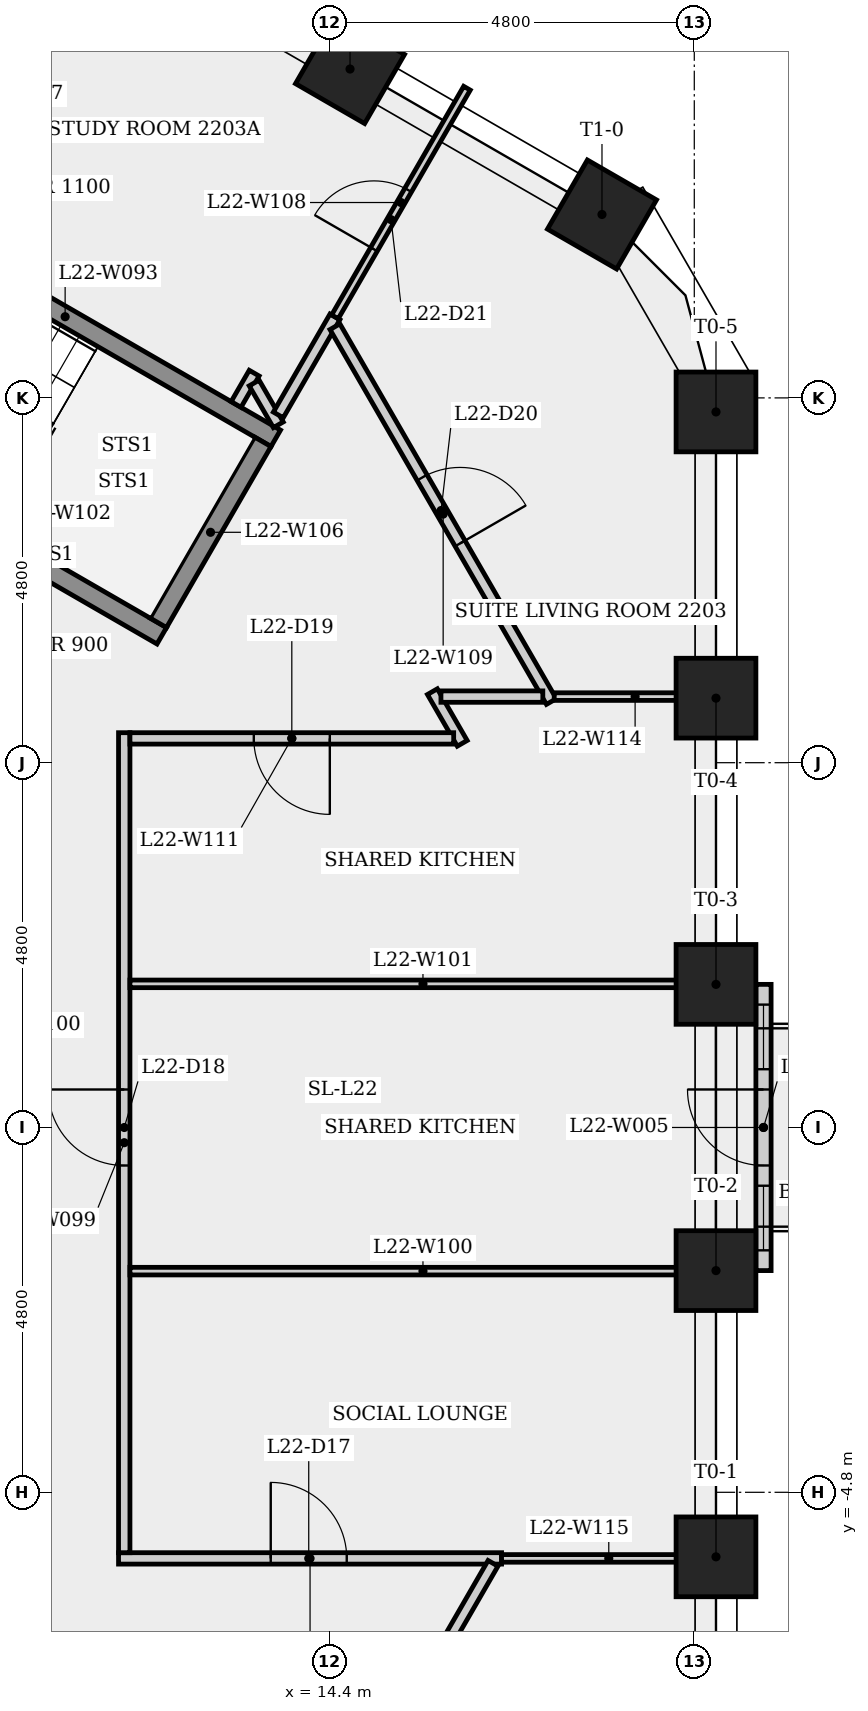
"""IFC4 building model, lengths in metres.
Left out: names, types, materials, properties, quantities, classifications, styles, units other than length and angle.
Written with IfcOpenShell. Run it as: python <this file> out.ifc"""

import sys

from ifc_helpers import new_model, si_unit, direction, frame, frame_2d, origin, origin_2d, place, context, subcontext, project, spatial, rectangle, extrude, element, fill, save


model = new_model("IFC4")
c1 = context("Model", 3, precision=1e-05, world=origin(), true_north=direction((0.0, 1.0)))
c2 = subcontext(c1, "Body", "Model", "MODEL_VIEW")
j1 = project(units=[si_unit("LENGTHUNIT", "METRE"), si_unit("PLANEANGLEUNIT", "RADIAN")], contexts=[c1])
p1 = place(None, origin())
s1 = spatial("IfcSite", under=j1, at=p1, CompositionType="ELEMENT")
p2 = place(p1, origin())
s2 = spatial("IfcBuilding", under=s1, at=p2, CompositionType="ELEMENT")
p3 = place(p2, frame((0.0, 0.0, 86.5)))
s3 = spatial("IfcBuildingStorey", under=s2, at=p3, CompositionType="ELEMENT", Elevation=86.5)
for number, where, z_axis, x_axis in (
    (1, (19.486, -5.649, 0.0), (0.0, 0.0, 1.0), (1.0, 0.0, 0.0)),
    (2, (19.486, -1.883, 0.0), (0.0, 0.0, 1.0), (1.0, 0.0, 0.0)),
    (3, (19.486, 1.883, 0.0), (0.0, 0.0, 1.0), (1.0, 0.0, 0.0)),
    (4, (19.486, 5.649, 0.0), (0.0, 0.0, 1.0), (1.0, 0.0, 0.0)),
    (5, (19.486, 9.415, 0.0), (0.0, 0.0, 1.0), (1.0, 0.0, 0.0)),
    (6, (17.986, 12.013, 0.0), (0.0, 0.0, 1.0), (0.5, 0.866, 0.0)),
    (7, (14.671, 13.927, 0.0), (0.0, 0.0, 1.0), (0.5, 0.866, 0.0)),
):
    element("IfcColumn", number, at=place(p3, frame(where, z_axis=z_axis, x_axis=x_axis)), inside=s3, PredefinedType="COLUMN", context=c2, shape_type="SweptSolid", body=[
        extrude(rectangle(XDim=1.05, YDim=1.05, at=origin_2d()), origin(), (0.0, 0.0, 1.0), 3.4),
    ])
p4 = place(p3, frame((20.111, -1.883, 0.0), z_axis=(0.0, 0.0, 1.0), x_axis=(0.0, 1.0, 0.0)))
e8 = element("IfcWall", 8, at=p4, inside=s3, PredefinedType="SOLIDWALL", context=c2, shape_type="SweptSolid", body=[
    extrude(rectangle(XDim=3.766, YDim=0.2, at=frame_2d((1.883, 0.0))), origin(), (0.0, 0.0, 1.0), 3.4),
])
p5 = place(p4, frame((1.383, 0.0, 0.0)))
e9 = element("IfcOpeningElement", 9, at=p5, cuts=e8, PredefinedType="OPENING", context=c2, shape_type="SweptSolid", body=[
    extrude(rectangle(XDim=1.0, YDim=2.4, at=frame_2d((0.5, 1.2))), frame((0.0, 0.11, 0.0), z_axis=(0.0, -1.0, 0.0), x_axis=(1.0, 0.0, 0.0)), (0.0, 0.0, 1.0), 0.22),
])
p6 = place(p4, frame((0.267, 0.0, 0.9)))
e10 = element("IfcOpeningElement", 10, at=p6, cuts=e8, PredefinedType="OPENING", context=c2, shape_type="SweptSolid", body=[
    extrude(rectangle(XDim=0.85, YDim=1.5, at=frame_2d((0.425, 0.75))), frame((0.0, 0.11, 0.0), z_axis=(0.0, -1.0, 0.0), x_axis=(1.0, 0.0, 0.0)), (0.0, 0.0, 1.0), 0.22),
])
p7 = place(p4, frame((2.649, 0.0, 0.9)))
e11 = element("IfcOpeningElement", 11, at=p7, cuts=e8, PredefinedType="OPENING", context=c2, shape_type="SweptSolid", body=[
    extrude(rectangle(XDim=0.85, YDim=1.5, at=frame_2d((0.425, 0.75))), frame((0.0, 0.11, 0.0), z_axis=(0.0, -1.0, 0.0), x_axis=(1.0, 0.0, 0.0)), (0.0, 0.0, 1.0), 0.22),
])
p8 = place(p3, frame((8.151, 12.268, 0.0), z_axis=(0.0, 0.0, 1.0), x_axis=(0.866025499775, -0.499999833739, 0.0)))
e12 = element("IfcWall", 12, at=p8, inside=s3, PredefinedType="SHEAR", context=c2, shape_type="SweptSolid", body=[
    extrude(rectangle(XDim=6.4, YDim=0.25, at=frame_2d((3.2, 0.0))), origin(), (0.0, 0.0, 1.0), 3.05),
])
p9 = place(p3, frame((11.625, -5.67, 0.0), z_axis=(0.0, 0.0, 1.0), x_axis=(1.0, 0.0, 0.0)))
e13 = element("IfcWall", 13, at=p9, inside=s3, PredefinedType="PARTITIONING", context=c2, shape_type="SweptSolid", body=[
    extrude(rectangle(XDim=5.039, YDim=0.15, at=frame_2d((2.52, 0.0))), origin(), (0.0, 0.0, 1.0), 3.05),
])
p10 = place(p9, frame((2.002, 0.0, 0.0)))
e14 = element("IfcOpeningElement", 14, at=p10, cuts=e13, PredefinedType="OPENING", context=c2, shape_type="SweptSolid", body=[
    extrude(rectangle(XDim=1.0, YDim=2.1, at=frame_2d((0.5, 1.05))), frame((0.0, 0.085, 0.0), z_axis=(0.0, -1.0, 0.0), x_axis=(1.0, 0.0, 0.0)), (0.0, 0.0, 1.0), 0.17),
])
p11 = place(p3, frame((11.7, -5.595, 0.0), z_axis=(0.0, 0.0, 1.0), x_axis=(0.0, 1.0, 0.0)))
e15 = element("IfcWall", 15, at=p11, inside=s3, PredefinedType="PARTITIONING", context=c2, shape_type="SweptSolid", body=[
    extrude(rectangle(XDim=10.789, YDim=0.15, at=frame_2d((5.395, 0.0))), origin(), (0.0, 0.0, 1.0), 3.05),
])
p12 = place(p11, frame((5.095, 0.0, 0.0)))
e16 = element("IfcOpeningElement", 16, at=p12, cuts=e15, PredefinedType="OPENING", context=c2, shape_type="SweptSolid", body=[
    extrude(rectangle(XDim=1.0, YDim=2.1, at=frame_2d((0.5, 1.05))), frame((0.0, 0.085, 0.0), z_axis=(0.0, -1.0, 0.0), x_axis=(1.0, 0.0, 0.0)), (0.0, 0.0, 1.0), 0.17),
])
for number, where, z_axis, x_axis in (
    (17, (11.775, -1.89, 0.0), (0.0, 0.0, 1.0), (1.0, 0.0, 0.0)),
    (18, (11.775, 1.89, 0.0), (0.0, 0.0, 1.0), (1.0, 0.0, 0.0)),
):
    element("IfcWall", number, at=place(p3, frame(where, z_axis=z_axis, x_axis=x_axis)), inside=s3, PredefinedType="PARTITIONING", context=c2, shape_type="SweptSolid", body=[
        extrude(rectangle(XDim=7.711, YDim=0.1, at=frame_2d((3.855, 0.0))), origin(), (0.0, 0.0, 1.0), 3.05),
    ])
p13 = place(p3, frame((12.194, 6.47, 0.0), z_axis=(0.0, 0.0, 1.0), x_axis=(-0.866025499775, 0.499999833739, 0.0)))
e19 = element("IfcWall", 19, at=p13, inside=s3, PredefinedType="SHEAR", context=c2, shape_type="SweptSolid", body=[
    extrude(rectangle(XDim=6.4, YDim=0.25, at=frame_2d((3.2, 0.0))), origin(), (0.0, 0.0, 1.0), 3.05),
])
p14 = place(p13, frame((5.25, 0.0, 0.0)))
e20 = element("IfcOpeningElement", 20, at=p14, cuts=e19, PredefinedType="OPENING", context=c2, shape_type="SweptSolid", body=[
    extrude(rectangle(XDim=1.0, YDim=2.1, at=frame_2d((0.5, 1.05))), frame((0.0, 0.135, 0.0), z_axis=(0.0, -1.0, 0.0), x_axis=(1.0, 0.0, 0.0)), (0.0, 0.0, 1.0), 0.27),
])
p15 = place(p3, frame((13.172, 9.514, 0.0), z_axis=(0.0, 0.0, 1.0), x_axis=(0.500003887042, 0.866023159588, 0.0)))
e21 = element("IfcWall", 21, at=p15, inside=s3, PredefinedType="PARTITIONING", context=c2, shape_type="SweptSolid", body=[
    extrude(rectangle(XDim=0.476, YDim=0.15, at=frame_2d((0.238, 0.0))), origin(), (0.0, 0.0, 1.0), 3.05),
])
p16 = place(p3, frame((13.409, 9.796, 0.0), z_axis=(0.0, 0.0, 1.0), x_axis=(0.500232755635, -0.865890980545, 0.0)))
e22 = element("IfcWall", 22, at=p16, inside=s3, PredefinedType="PARTITIONING", context=c2, shape_type="SweptSolid", body=[
    extrude(rectangle(XDim=0.635, YDim=0.15, at=frame_2d((0.317, 0.0))), origin(), (0.0, 0.0, 1.0), 3.05),
])
p17 = place(p3, frame((13.523, 9.022, 0.0), z_axis=(0.0, 0.0, 1.0), x_axis=(-0.500034990121, -0.866005201286, 0.0)))
e23 = element("IfcWall", 23, at=p17, inside=s3, PredefinedType="SHEAR", context=c2, shape_type="SweptSolid", body=[
    extrude(rectangle(XDim=2.75, YDim=0.25, at=frame_2d((1.375, 0.0))), origin(), (0.0, 0.0, 1.0), 3.05),
])
p18 = place(p3, frame((13.727, 9.376, 0.0), z_axis=(0.0, 0.0, 1.0), x_axis=(0.500015540671, 0.866016431188, 0.0)))
e24 = element("IfcWall", 24, at=p18, inside=s3, PredefinedType="PARTITIONING", context=c2, shape_type="SweptSolid", body=[
    extrude(rectangle(XDim=1.49, YDim=0.15, at=frame_2d((0.745, 0.0))), origin(), (0.0, 0.0, 1.0), 3.05),
])
p19 = place(p3, frame((14.472, 10.667, 0.0), z_axis=(0.0, 0.0, 1.0), x_axis=(0.499994200737, 0.866028751965, 0.0)))
e25 = element("IfcWall", 25, at=p19, inside=s3, PredefinedType="PARTITIONING", context=c2, shape_type="SweptSolid", body=[
    extrude(rectangle(XDim=3.474, YDim=0.1, at=frame_2d((1.737, 0.0))), origin(), (0.0, 0.0, 1.0), 3.05),
])
p20 = place(p19, frame((1.026, 0.0, 0.0)))
e26 = element("IfcOpeningElement", 26, at=p20, cuts=e25, PredefinedType="OPENING", context=c2, shape_type="SweptSolid", body=[
    extrude(rectangle(XDim=0.9, YDim=2.1, at=frame_2d((0.45, 1.05))), frame((0.0, 0.06, 0.0), z_axis=(0.0, -1.0, 0.0), x_axis=(1.0, 0.0, 0.0)), (0.0, 0.0, 1.0), 0.12),
])
p21 = place(p3, frame((14.472, 10.537, 0.0), z_axis=(0.0, 0.0, 1.0), x_axis=(0.499998302717, -0.866026383709, 0.0)))
e27 = element("IfcWall", 27, at=p21, inside=s3, PredefinedType="PARTITIONING", context=c2, shape_type="SweptSolid", body=[
    extrude(rectangle(XDim=5.695, YDim=0.15, at=frame_2d((2.847, 0.0))), origin(), (0.0, 0.0, 1.0), 3.05),
])
p22 = place(p21, frame((2.293, 0.0, 0.0)))
e28 = element("IfcOpeningElement", 28, at=p22, cuts=e27, PredefinedType="OPENING", context=c2, shape_type="SweptSolid", body=[
    extrude(rectangle(XDim=1.0, YDim=2.1, at=frame_2d((0.5, 1.05))), frame((0.0, 0.085, 0.0), z_axis=(0.0, -1.0, 0.0), x_axis=(1.0, 0.0, 0.0)), (0.0, 0.0, 1.0), 0.17),
])
p23 = place(p3, frame((15.754, 5.735, 0.0), z_axis=(0.0, 0.0, 1.0), x_axis=(0.500018540756, -0.866014699009, 0.0)))
e29 = element("IfcWall", 29, at=p23, inside=s3, PredefinedType="PARTITIONING", context=c2, shape_type="SweptSolid", body=[
    extrude(rectangle(XDim=0.785, YDim=0.15, at=frame_2d((0.393, 0.0))), origin(), (0.0, 0.0, 1.0), 3.05),
])
p24 = place(p3, frame((16.034, 5.12, 0.0), z_axis=(0.0, 0.0, 1.0), x_axis=(-1.0, 0.0, 0.0)))
e30 = element("IfcWall", 30, at=p24, inside=s3, PredefinedType="PARTITIONING", context=c2, shape_type="SweptSolid", body=[
    extrude(rectangle(XDim=4.26, YDim=0.15, at=frame_2d((2.13, 0.0))), origin(), (0.0, 0.0, 1.0), 3.05),
])
p25 = place(p24, frame((1.63, 0.0, 0.0)))
e31 = element("IfcOpeningElement", 31, at=p25, cuts=e30, PredefinedType="OPENING", context=c2, shape_type="SweptSolid", body=[
    extrude(rectangle(XDim=1.0, YDim=2.1, at=frame_2d((0.5, 1.05))), frame((0.0, 0.085, 0.0), z_axis=(0.0, -1.0, 0.0), x_axis=(1.0, 0.0, 0.0)), (0.0, 0.0, 1.0), 0.17),
])
p26 = place(p3, frame((16.552, -5.735, 0.0), z_axis=(0.0, 0.0, 1.0), x_axis=(-0.500003678222, -0.866023280152, 0.0)))
e32 = element("IfcWall", 32, at=p26, inside=s3, PredefinedType="PARTITIONING", context=c2, shape_type="SweptSolid", body=[
    extrude(rectangle(XDim=8.316, YDim=0.15, at=frame_2d((4.158, 0.0))), origin(), (0.0, 0.0, 1.0), 3.05),
])
p27 = place(p26, frame((3.658, 0.0, 0.0)))
e33 = element("IfcOpeningElement", 33, at=p27, cuts=e32, PredefinedType="OPENING", context=c2, shape_type="SweptSolid", body=[
    extrude(rectangle(XDim=1.0, YDim=2.1, at=frame_2d((0.5, 1.05))), frame((0.0, 0.085, 0.0), z_axis=(0.0, -1.0, 0.0), x_axis=(1.0, 0.0, 0.0)), (0.0, 0.0, 1.0), 0.17),
])
p28 = place(p3, frame((17.207, 5.67, 0.0), z_axis=(0.0, 0.0, 1.0), x_axis=(-1.0, 0.0, 0.0)))
e34 = element("IfcWall", 34, at=p28, inside=s3, PredefinedType="PARTITIONING", context=c2, shape_type="SweptSolid", body=[
    extrude(rectangle(XDim=1.34, YDim=0.15, at=frame_2d((0.67, 0.0))), origin(), (0.0, 0.0, 1.0), 3.05),
])
p29 = place(p3, frame((17.357, 5.67, 0.0), z_axis=(0.0, 0.0, 1.0), x_axis=(1.0, 0.0, 0.0)))
e35 = element("IfcWall", 35, at=p29, inside=s3, PredefinedType="PARTITIONING", context=c2, shape_type="SweptSolid", body=[
    extrude(rectangle(XDim=2.128, YDim=0.1, at=frame_2d((1.064, 0.0))), origin(), (0.0, 0.0, 1.0), 3.05),
])
p30 = place(p3, frame((19.486, -5.67, 0.0), z_axis=(0.0, 0.0, 1.0), x_axis=(-1.0, 0.0, 0.0)))
e36 = element("IfcWall", 36, at=p30, inside=s3, PredefinedType="PARTITIONING", context=c2, shape_type="SweptSolid", body=[
    extrude(rectangle(XDim=2.821, YDim=0.1, at=frame_2d((1.411, 0.0))), origin(), (0.0, 0.0, 1.0), 3.05),
])
p31 = place(p5, origin())
e37 = element("IfcDoor", 37, at=p31, inside=s3, OperationType="SINGLE_SWING_RIGHT", PredefinedType="DOOR", context=c2, shape_type="SweptSolid", body=[
    extrude(rectangle(XDim=1.0, YDim=2.4, at=frame_2d((0.5, 1.2))), frame((0.0, 0.025, 0.0), z_axis=(0.0, -1.0, 0.0), x_axis=(1.0, 0.0, 0.0)), (0.0, 0.0, 1.0), 0.05),
])
fill(e9, e37)
p32 = place(p6, origin())
e38 = element("IfcWindow", 38, at=p32, inside=s3, PartitioningType="SINGLE_PANEL", PredefinedType="WINDOW", context=c2, shape_type="SweptSolid", body=[
    extrude(rectangle(XDim=0.85, YDim=1.5, at=frame_2d((0.425, 0.75))), frame((0.0, 0.03, 0.0), z_axis=(0.0, -1.0, 0.0), x_axis=(1.0, 0.0, 0.0)), (0.0, 0.0, 1.0), 0.06),
])
fill(e10, e38)
p33 = place(p7, origin())
e39 = element("IfcWindow", 39, at=p33, inside=s3, PartitioningType="SINGLE_PANEL", PredefinedType="WINDOW", context=c2, shape_type="SweptSolid", body=[
    extrude(rectangle(XDim=0.85, YDim=1.5, at=frame_2d((0.425, 0.75))), frame((0.0, 0.03, 0.0), z_axis=(0.0, -1.0, 0.0), x_axis=(1.0, 0.0, 0.0)), (0.0, 0.0, 1.0), 0.06),
])
fill(e11, e39)
p34 = place(p10, origin())
e40 = element("IfcDoor", 40, at=p34, inside=s3, OperationType="SINGLE_SWING_LEFT", PredefinedType="DOOR", context=c2, shape_type="SweptSolid", body=[
    extrude(rectangle(XDim=1.0, YDim=2.1, at=frame_2d((0.5, 1.05))), frame((0.0, 0.025, 0.0), z_axis=(0.0, -1.0, 0.0), x_axis=(1.0, 0.0, 0.0)), (0.0, 0.0, 1.0), 0.05),
])
fill(e14, e40)
p35 = place(p12, origin())
e41 = element("IfcDoor", 41, at=p35, inside=s3, OperationType="SINGLE_SWING_RIGHT", PredefinedType="DOOR", context=c2, shape_type="SweptSolid", body=[
    extrude(rectangle(XDim=1.0, YDim=2.1, at=frame_2d((0.5, 1.05))), frame((0.0, 0.025, 0.0), z_axis=(0.0, -1.0, 0.0), x_axis=(1.0, 0.0, 0.0)), (0.0, 0.0, 1.0), 0.05),
])
fill(e16, e41)
p36 = place(p25, origin())
e42 = element("IfcDoor", 42, at=p36, inside=s3, OperationType="SINGLE_SWING_LEFT", PredefinedType="DOOR", context=c2, shape_type="SweptSolid", body=[
    extrude(rectangle(XDim=1.0, YDim=2.1, at=frame_2d((0.5, 1.05))), frame((0.0, 0.025, 0.0), z_axis=(0.0, -1.0, 0.0), x_axis=(1.0, 0.0, 0.0)), (0.0, 0.0, 1.0), 0.05),
])
fill(e31, e42)
p37 = place(p22, origin())
e43 = element("IfcDoor", 43, at=p37, inside=s3, OperationType="SINGLE_SWING_RIGHT", PredefinedType="DOOR", context=c2, shape_type="SweptSolid", body=[
    extrude(rectangle(XDim=1.0, YDim=2.1, at=frame_2d((0.5, 1.05))), frame((0.0, 0.025, 0.0), z_axis=(0.0, -1.0, 0.0), x_axis=(1.0, 0.0, 0.0)), (0.0, 0.0, 1.0), 0.05),
])
fill(e28, e43)
p38 = place(p20, origin())
e44 = element("IfcDoor", 44, at=p38, inside=s3, OperationType="SINGLE_SWING_LEFT", PredefinedType="DOOR", context=c2, shape_type="SweptSolid", body=[
    extrude(rectangle(XDim=0.9, YDim=2.1, at=frame_2d((0.45, 1.05))), frame((0.0, 0.025, 0.0), z_axis=(0.0, -1.0, 0.0), x_axis=(1.0, 0.0, 0.0)), (0.0, 0.0, 1.0), 0.05),
])
fill(e26, e44)
save(model, sys.argv[1])
